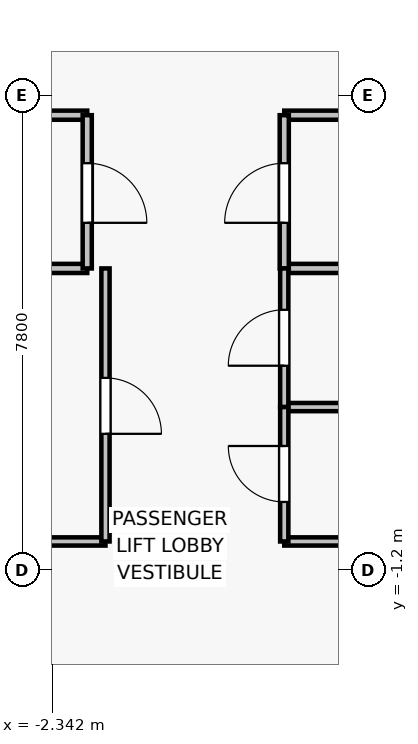
"""IFC4 building model, lengths in metres.
Left out: names, types, materials, properties, quantities, classifications, styles, units other than length and angle.
Written with IfcOpenShell. Run it as: python <this file> out.ifc"""

import sys

from ifc_helpers import new_model, si_unit, direction, frame, frame_2d, origin, place, context, subcontext, project, spatial, rectangle, extrude, source, transform, mapped, element, fill, save


model = new_model("IFC4")
c1 = context("Model", 3, precision=1e-05, world=origin(), true_north=direction((0.0, 1.0)))
c2 = subcontext(c1, "Body", "Model", "MODEL_VIEW")
j1 = project(units=[si_unit("LENGTHUNIT", "METRE"), si_unit("PLANEANGLEUNIT", "RADIAN")], contexts=[c1])
p1 = place(None, origin())
s1 = spatial("IfcSite", under=j1, at=p1, CompositionType="ELEMENT")
p2 = place(p1, origin())
s2 = spatial("IfcBuilding", under=s1, at=p2, CompositionType="ELEMENT")
p3 = place(p2, frame((0.0, 0.0, 205.6)))
s3 = spatial("IfcBuildingStorey", under=s2, at=p3, CompositionType="ELEMENT", Elevation=205.6)
for number, where, z_axis, x_axis in (
    (1, (-1.77, 3.76, 0.0), (0.0, 0.0, 1.0), (-1.0, 0.0, 0.0)),
    (2, (-6.18, 6.28, 0.0), (0.0, 0.0, 1.0), (1.0, 0.0, 0.0)),
):
    element("IfcWall", number, at=place(p3, frame(where, z_axis=z_axis, x_axis=x_axis)), inside=s3, PredefinedType="PARTITIONING", context=c2, shape_type="SweptSolid", body=[
        extrude(rectangle(XDim=4.41, YDim=0.15, at=frame_2d((2.205, 0.0))), origin(), (0.0, 0.0, 1.0), 3.075),
    ])
p4 = place(p3, frame((-1.77, 6.28, 0.0), z_axis=(0.0, 0.0, 1.0), x_axis=(0.0, -1.0, 0.0)))
e3 = element("IfcWall", 3, at=p4, inside=s3, PredefinedType="PARTITIONING", context=c2, shape_type="SweptSolid", body=[
    extrude(rectangle(XDim=2.52, YDim=0.15, at=frame_2d((1.26, 0.0))), origin(), (0.0, 0.0, 1.0), 3.075),
])
p5 = place(p4, frame((0.79, 0.0, 0.0)))
e4 = element("IfcOpeningElement", 4, at=p5, cuts=e3, PredefinedType="OPENING", context=c2, shape_type="SweptSolid", body=[
    extrude(rectangle(XDim=0.98, YDim=2.15, at=frame_2d((0.49, 1.075))), frame((0.0, 0.085, 0.0), z_axis=(0.0, -1.0, 0.0), x_axis=(1.0, 0.0, 0.0)), (0.0, 0.0, 1.0), 0.17),
])
for number, where, z_axis, x_axis in (
    (5, (6.38, 3.76, 0.0), (0.0, 0.0, 1.0), (-1.0, 0.0, 0.0)),
    (6, (1.47, 6.28, 0.0), (0.0, 0.0, 1.0), (1.0, 0.0, 0.0)),
):
    element("IfcWall", number, at=place(p3, frame(where, z_axis=z_axis, x_axis=x_axis)), inside=s3, PredefinedType="PARTITIONING", context=c2, shape_type="SweptSolid", body=[
        extrude(rectangle(XDim=4.91, YDim=0.15, at=frame_2d((2.455, 0.0))), origin(), (0.0, 0.0, 1.0), 3.075),
    ])
p6 = place(p3, frame((1.47, 3.76, 0.0), z_axis=(0.0, 0.0, 1.0), x_axis=(0.0, 1.0, 0.0)))
e7 = element("IfcWall", 7, at=p6, inside=s3, PredefinedType="PARTITIONING", context=c2, shape_type="SweptSolid", body=[
    extrude(rectangle(XDim=2.52, YDim=0.15, at=frame_2d((1.26, 0.0))), origin(), (0.0, 0.0, 1.0), 3.075),
])
p7 = place(p6, frame((0.75, 0.0, 0.0)))
e8 = element("IfcOpeningElement", 8, at=p7, cuts=e7, PredefinedType="OPENING", context=c2, shape_type="SweptSolid", body=[
    extrude(rectangle(XDim=0.98, YDim=2.15, at=frame_2d((0.49, 1.075))), frame((0.0, 0.085, 0.0), z_axis=(0.0, -1.0, 0.0), x_axis=(1.0, 0.0, 0.0)), (0.0, 0.0, 1.0), 0.17),
])
p8 = place(p3, frame((-1.47, -0.73, 0.0), z_axis=(0.0, 0.0, 1.0), x_axis=(-1.0, 0.0, 0.0)))
e9 = element("IfcWall", 9, at=p8, inside=s3, PredefinedType="PARTITIONING", context=c2, shape_type="SweptSolid", body=[
    extrude(rectangle(XDim=5.11, YDim=0.135, at=frame_2d((2.555, 0.0))), origin(), (0.0, 0.0, 1.0), 3.075),
])
p9 = place(p3, frame((-1.47, 3.76, 0.0), z_axis=(0.0, 0.0, 1.0), x_axis=(0.0, -1.0, 0.0)))
e10 = element("IfcWall", 10, at=p9, inside=s3, PredefinedType="PARTITIONING", context=c2, shape_type="SweptSolid", body=[
    extrude(rectangle(XDim=4.49, YDim=0.135, at=frame_2d((2.245, 0.0))), origin(), (0.0, 0.0, 1.0), 3.075),
])
p10 = place(p9, frame((1.8, 0.0, 0.0)))
e11 = element("IfcOpeningElement", 11, at=p10, cuts=e10, PredefinedType="OPENING", context=c2, shape_type="SweptSolid", body=[
    extrude(rectangle(XDim=0.92, YDim=2.1, at=frame_2d((0.46, 1.05))), frame((0.0, 0.077, 0.0), z_axis=(0.0, -1.0, 0.0), x_axis=(1.0, 0.0, 0.0)), (0.0, 0.0, 1.0), 0.155),
])
p11 = place(p3, frame((6.58, 1.48, 0.0), z_axis=(0.0, 0.0, 1.0), x_axis=(-1.0, 0.0, 0.0)))
e12 = element("IfcWall", 12, at=p11, inside=s3, PredefinedType="PARTITIONING", context=c2, shape_type="SweptSolid", body=[
    extrude(rectangle(XDim=5.11, YDim=0.135, at=frame_2d((2.555, 0.0))), origin(), (0.0, 0.0, 1.0), 3.075),
])
p12 = place(p3, frame((1.47, 1.48, 0.0), z_axis=(0.0, 0.0, 1.0), x_axis=(0.0, 1.0, 0.0)))
e13 = element("IfcWall", 13, at=p12, inside=s3, PredefinedType="PARTITIONING", context=c2, shape_type="SweptSolid", body=[
    extrude(rectangle(XDim=2.28, YDim=0.135, at=frame_2d((1.14, 0.0))), origin(), (0.0, 0.0, 1.0), 3.075),
])
p13 = place(p12, frame((0.68, 0.0, 0.0)))
e14 = element("IfcOpeningElement", 14, at=p13, cuts=e13, PredefinedType="OPENING", context=c2, shape_type="SweptSolid", body=[
    extrude(rectangle(XDim=0.92, YDim=2.1, at=frame_2d((0.46, 1.05))), frame((0.0, 0.077, 0.0), z_axis=(0.0, -1.0, 0.0), x_axis=(1.0, 0.0, 0.0)), (0.0, 0.0, 1.0), 0.155),
])
p14 = place(p3, frame((4.18, -0.73, 0.0), z_axis=(0.0, 0.0, 1.0), x_axis=(-1.0, 0.0, 0.0)))
e15 = element("IfcWall", 15, at=p14, inside=s3, PredefinedType="PARTITIONING", context=c2, shape_type="SweptSolid", body=[
    extrude(rectangle(XDim=2.71, YDim=0.135, at=frame_2d((1.355, 0.0))), origin(), (0.0, 0.0, 1.0), 3.075),
])
p15 = place(p3, frame((1.47, -0.73, 0.0), z_axis=(0.0, 0.0, 1.0), x_axis=(0.0, 1.0, 0.0)))
e16 = element("IfcWall", 16, at=p15, inside=s3, PredefinedType="PARTITIONING", context=c2, shape_type="SweptSolid", body=[
    extrude(rectangle(XDim=2.21, YDim=0.135, at=frame_2d((1.105, 0.0))), origin(), (0.0, 0.0, 1.0), 3.075),
])
p16 = place(p15, frame((0.65, 0.0, 0.0)))
e17 = element("IfcOpeningElement", 17, at=p16, cuts=e16, PredefinedType="OPENING", context=c2, shape_type="SweptSolid", body=[
    extrude(rectangle(XDim=0.92, YDim=2.1, at=frame_2d((0.46, 1.05))), frame((0.0, 0.077, 0.0), z_axis=(0.0, -1.0, 0.0), x_axis=(1.0, 0.0, 0.0)), (0.0, 0.0, 1.0), 0.155),
])
m1 = source(origin(), c2, "Body", "SweptSolid", [
    extrude(rectangle(XDim=0.98, YDim=2.15, at=frame_2d((0.49, 1.075))), frame((0.0, 0.025, 0.0), z_axis=(0.0, -1.0, 0.0), x_axis=(1.0, 0.0, 0.0)), (0.0, 0.0, 1.0), 0.05),
])
p17 = place(p5, origin())
e18 = element("IfcDoor", 18, at=p17, inside=s3, OperationType="SINGLE_SWING_RIGHT", PredefinedType="DOOR", context=c2, shape_type="MappedRepresentation", body=[
    mapped(m1, transform((0.0, 0.0, 0.0), x_axis=(1.0, 0.0, 0.0), y_axis=(0.0, 1.0, 0.0), z_axis=(0.0, 0.0, 1.0), scale=1.0)),
])
fill(e4, e18)
p18 = place(p7, origin())
e19 = element("IfcDoor", 19, at=p18, inside=s3, OperationType="SINGLE_SWING_LEFT", PredefinedType="DOOR", context=c2, shape_type="MappedRepresentation", body=[
    mapped(m1, transform((0.0, 0.0, 0.0), x_axis=(1.0, 0.0, 0.0), y_axis=(0.0, 1.0, 0.0), z_axis=(0.0, 0.0, 1.0), scale=1.0)),
])
fill(e8, e19)
m2 = source(origin(), c2, "Body", "SweptSolid", [
    extrude(rectangle(XDim=0.92, YDim=2.1, at=frame_2d((0.46, 1.05))), frame((0.0, 0.025, 0.0), z_axis=(0.0, -1.0, 0.0), x_axis=(1.0, 0.0, 0.0)), (0.0, 0.0, 1.0), 0.05),
])
p19 = place(p10, origin())
e20 = element("IfcDoor", 20, at=p19, inside=s3, OperationType="SINGLE_SWING_RIGHT", PredefinedType="DOOR", context=c2, shape_type="MappedRepresentation", body=[
    mapped(m2, transform((0.0, 0.0, 0.0), x_axis=(1.0, 0.0, 0.0), y_axis=(0.0, 1.0, 0.0), z_axis=(0.0, 0.0, 1.0), scale=1.0)),
])
fill(e11, e20)
p20 = place(p13, origin())
e21 = element("IfcDoor", 21, at=p20, inside=s3, OperationType="SINGLE_SWING_LEFT", PredefinedType="DOOR", context=c2, shape_type="MappedRepresentation", body=[
    mapped(m2, transform((0.0, 0.0, 0.0), x_axis=(1.0, 0.0, 0.0), y_axis=(0.0, 1.0, 0.0), z_axis=(0.0, 0.0, 1.0), scale=1.0)),
])
fill(e14, e21)
p21 = place(p16, origin())
e22 = element("IfcDoor", 22, at=p21, inside=s3, OperationType="SINGLE_SWING_RIGHT", PredefinedType="DOOR", context=c2, shape_type="MappedRepresentation", body=[
    mapped(m2, transform((0.0, 0.0, 0.0), x_axis=(1.0, 0.0, 0.0), y_axis=(0.0, 1.0, 0.0), z_axis=(0.0, 0.0, 1.0), scale=1.0)),
])
fill(e17, e22)
save(model, sys.argv[1])
